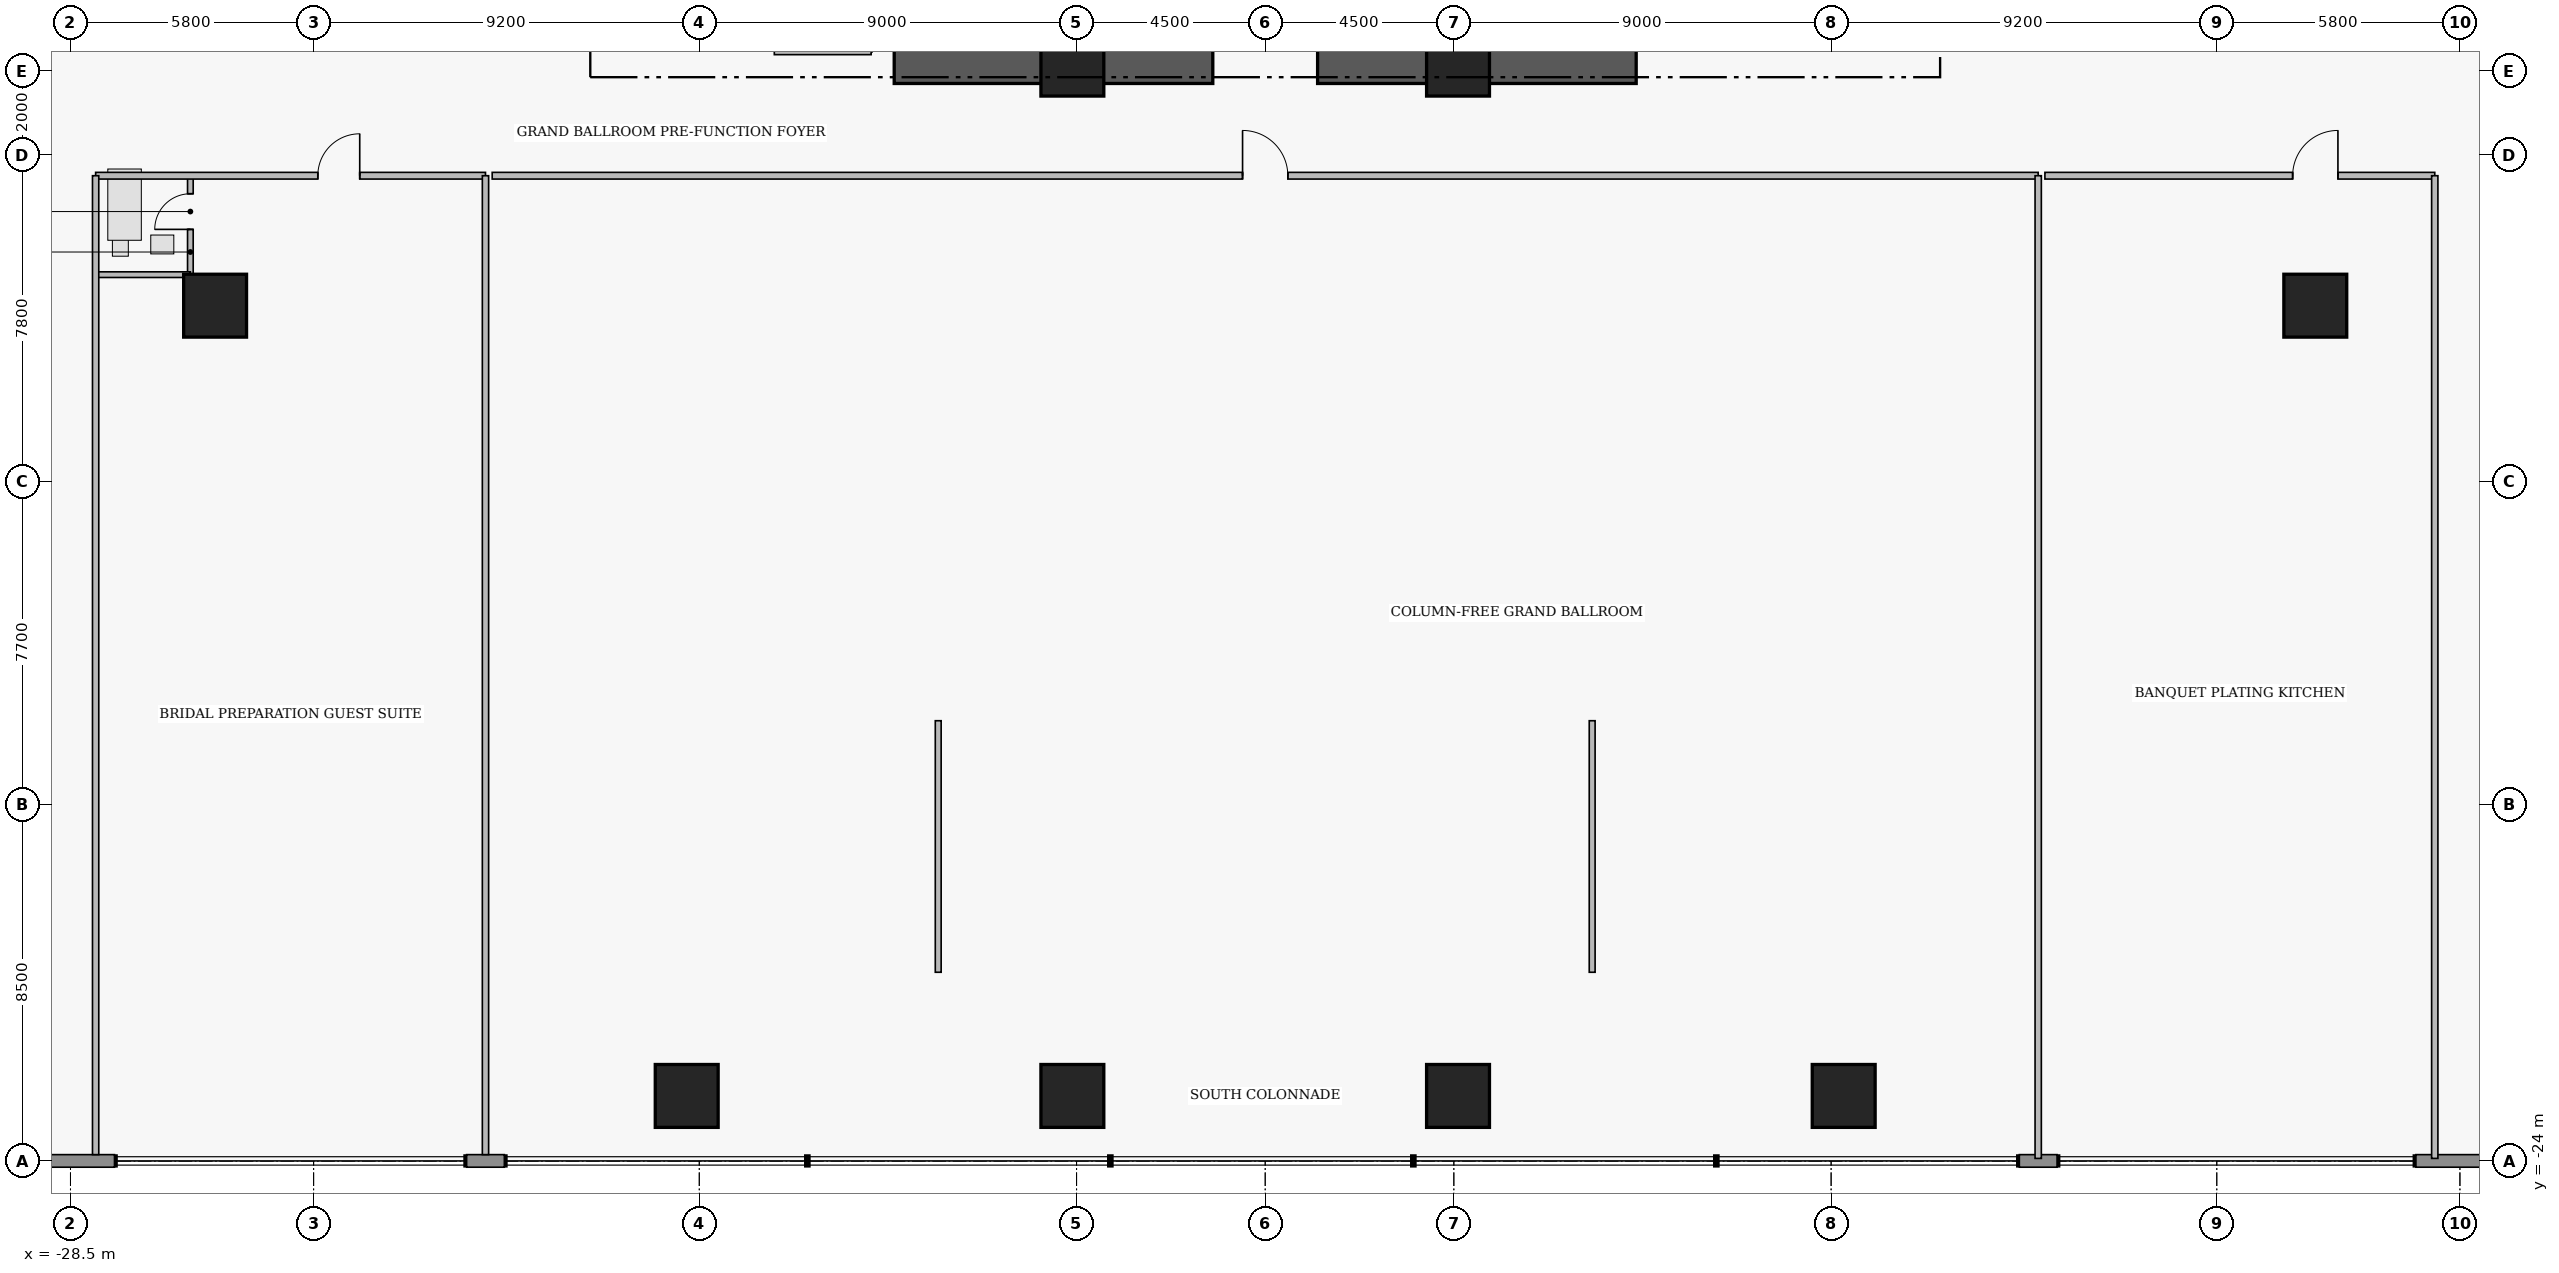
"""IFC4 building model, lengths in metres.
Left out: names, types, materials, properties, quantities, classifications, styles, units other than length and angle.
Written with IfcOpenShell. Run it as: python <this file> out.ifc"""

import sys

from ifc_helpers import new_model, si_unit, direction, frame, frame_2d, origin, origin_2d, place, context, subcontext, project, spatial, rectangle, extrude, element, fill, save


model = new_model("IFC4")
c1 = context("Model", 3, precision=1e-05, world=origin(), true_north=direction((0.0, 1.0)))
c2 = subcontext(c1, "Body", "Model", "MODEL_VIEW")
j1 = project(units=[si_unit("LENGTHUNIT", "METRE"), si_unit("PLANEANGLEUNIT", "RADIAN")], contexts=[c1])
p1 = place(None, origin())
s1 = spatial("IfcSite", under=j1, at=p1, CompositionType="ELEMENT")
p2 = place(p1, origin())
s2 = spatial("IfcBuilding", under=s1, at=p2, CompositionType="ELEMENT")
p3 = place(p2, frame((0.0, 0.0, 11.4)))
s3 = spatial("IfcBuildingStorey", under=s2, at=p3, CompositionType="ELEMENT", Elevation=11.4)
for number, where, z_axis, x_axis in (
    (1, (-8.85, 2.15, 0.0), (0.0, 0.0, 1.0), (1.0, 0.0, 0.0)),
    (2, (1.25, 2.15, 0.0), (0.0, 0.0, 1.0), (1.0, 0.0, 0.0)),
):
    element("IfcWall", number, at=place(p3, frame(where, z_axis=z_axis, x_axis=x_axis)), inside=s3, PredefinedType="SHEAR", context=c2, shape_type="SweptSolid", body=[
        extrude(rectangle(XDim=7.6, YDim=0.9, at=frame_2d((3.8, 0.0))), origin(), (0.0, 0.0, 1.0), 6.34),
    ])
for number, where, z_axis, x_axis in (
    (3, (-4.6, 2.15, 0.0), (0.0, 0.0, 1.0), (1.0, 0.0, 0.0)),
    (4, (4.6, 2.15, 0.0), (0.0, 0.0, 1.0), (1.0, 0.0, 0.0)),
    (5, (-13.8, -22.45, 0.0), (0.0, 0.0, 1.0), (1.0, 0.0, 0.0)),
    (6, (-4.6, -22.45, 0.0), (0.0, 0.0, 1.0), (1.0, 0.0, 0.0)),
    (7, (4.6, -22.45, 0.0), (0.0, 0.0, 1.0), (1.0, 0.0, 0.0)),
    (8, (13.8, -22.45, 0.0), (0.0, 0.0, 1.0), (1.0, 0.0, 0.0)),
    (9, (-25.05, -3.6, 0.0), (0.0, 0.0, 1.0), (1.0, 0.0, 0.0)),
    (10, (25.05, -3.6, 0.0), (0.0, 0.0, 1.0), (1.0, 0.0, 0.0)),
):
    element("IfcColumn", number, at=place(p3, frame(where, z_axis=z_axis, x_axis=x_axis)), inside=s3, PredefinedType="COLUMN", context=c2, shape_type="SweptSolid", body=[
        extrude(rectangle(XDim=1.5, YDim=1.5, at=origin_2d()), origin(), (0.0, 0.0, 1.0), 6.6),
    ])
p4 = place(p3, frame((32.0, -24.0, 0.0), z_axis=(0.0, 0.0, 1.0), x_axis=(-1.0, 0.0, 0.0)))
e11 = element("IfcWall", 11, at=p4, inside=s3, PredefinedType="STANDARD", context=c2, shape_type="SweptSolid", body=[
    extrude(rectangle(XDim=4.55, YDim=0.3, at=frame_2d((2.275, 0.0))), origin(), (0.0, 0.0, 1.0), 6.34),
])
p5 = place(p3, frame((18.89, -24.0, 0.0), z_axis=(0.0, 0.0, 1.0), x_axis=(-1.0, 0.0, 0.0)))
e12 = element("IfcWall", 12, at=p5, inside=s3, PredefinedType="STANDARD", context=c2, shape_type="SweptSolid", body=[
    extrude(rectangle(XDim=0.9, YDim=0.3, at=frame_2d((0.45, 0.0))), origin(), (0.0, 0.0, 1.0), 6.34),
])
p6 = place(p3, frame((-18.15, -24.0, 0.0), z_axis=(0.0, 0.0, 1.0), x_axis=(-1.0, 0.0, 0.0)))
e13 = element("IfcWall", 13, at=p6, inside=s3, PredefinedType="STANDARD", context=c2, shape_type="SweptSolid", body=[
    extrude(rectangle(XDim=0.9, YDim=0.3, at=frame_2d((0.45, 0.0))), origin(), (0.0, 0.0, 1.0), 6.34),
])
p7 = place(p3, frame((-27.45, -24.0, 0.0), z_axis=(0.0, 0.0, 1.0), x_axis=(-1.0, 0.0, 0.0)))
e14 = element("IfcWall", 14, at=p7, inside=s3, PredefinedType="STANDARD", context=c2, shape_type="SweptSolid", body=[
    extrude(rectangle(XDim=4.55, YDim=0.3, at=frame_2d((2.275, 0.0))), origin(), (0.0, 0.0, 1.0), 6.34),
])
p8 = place(p3, frame((-25.64, -2.86, 0.0), z_axis=(0.0, 0.0, 1.0), x_axis=(0.0, 1.0, 0.0)))
e15 = element("IfcWall", 15, at=p8, inside=s3, PredefinedType="PLUMBINGWALL", context=c2, shape_type="SweptSolid", body=[
    extrude(rectangle(XDim=2.36, YDim=0.135, at=frame_2d((1.18, 0.0))), origin(), (0.0, 0.0, 1.0), 6.34),
])
p9 = place(p8, frame((1.08, 0.0, 0.0)))
e16 = element("IfcOpeningElement", 16, at=p9, cuts=e15, PredefinedType="OPENING", context=c2, shape_type="SweptSolid", body=[
    extrude(rectangle(XDim=0.85, YDim=2.1, at=frame_2d((0.425, 1.05))), frame((0.0, 0.077, 0.0), z_axis=(0.0, -1.0, 0.0), x_axis=(1.0, 0.0, 0.0)), (0.0, 0.0, 1.0), 0.155),
])
p10 = place(p3, frame((-27.9, -0.5, 0.0), z_axis=(0.0, 0.0, 1.0), x_axis=(1.0, 0.0, 0.0)))
e17 = element("IfcWall", 17, at=p10, inside=s3, PredefinedType="PARTITIONING", context=c2, shape_type="SweptSolid", body=[
    extrude(rectangle(XDim=9.3, YDim=0.16, at=frame_2d((4.65, 0.0))), origin(), (0.0, 0.0, 1.0), 6.34),
])
p11 = place(p10, frame((5.3, 0.0, 0.0)))
e18 = element("IfcOpeningElement", 18, at=p11, cuts=e17, PredefinedType="OPENING", context=c2, shape_type="SweptSolid", body=[
    extrude(rectangle(XDim=1.0, YDim=2.15, at=frame_2d((0.5, 1.075))), frame((0.0, 0.09, 0.0), z_axis=(0.0, -1.0, 0.0), x_axis=(1.0, 0.0, 0.0)), (0.0, 0.0, 1.0), 0.18),
])
p12 = place(p3, frame((-18.44, -0.5, 0.0), z_axis=(0.0, 0.0, 1.0), x_axis=(1.0, 0.0, 0.0)))
e19 = element("IfcWall", 19, at=p12, inside=s3, PredefinedType="PARTITIONING", context=c2, shape_type="SweptSolid", body=[
    extrude(rectangle(XDim=36.88, YDim=0.16, at=frame_2d((18.44, 0.0))), origin(), (0.0, 0.0, 1.0), 6.34),
])
p13 = place(p12, frame((17.9, 0.0, 0.0)))
e20 = element("IfcOpeningElement", 20, at=p13, cuts=e19, PredefinedType="OPENING", context=c2, shape_type="SweptSolid", body=[
    extrude(rectangle(XDim=1.08, YDim=2.18, at=frame_2d((0.54, 1.09))), frame((0.0, 0.09, 0.0), z_axis=(0.0, -1.0, 0.0), x_axis=(1.0, 0.0, 0.0)), (0.0, 0.0, 1.0), 0.18),
])
p14 = place(p3, frame((18.6, -0.5, 0.0), z_axis=(0.0, 0.0, 1.0), x_axis=(1.0, 0.0, 0.0)))
e21 = element("IfcWall", 21, at=p14, inside=s3, PredefinedType="PARTITIONING", context=c2, shape_type="SweptSolid", body=[
    extrude(rectangle(XDim=9.3, YDim=0.16, at=frame_2d((4.65, 0.0))), origin(), (0.0, 0.0, 1.0), 6.34),
])
p15 = place(p14, frame((5.91, 0.0, 0.0)))
e22 = element("IfcOpeningElement", 22, at=p15, cuts=e21, PredefinedType="OPENING", context=c2, shape_type="SweptSolid", body=[
    extrude(rectangle(XDim=1.08, YDim=2.18, at=frame_2d((0.54, 1.09))), frame((0.0, 0.09, 0.0), z_axis=(0.0, -1.0, 0.0), x_axis=(1.0, 0.0, 0.0)), (0.0, 0.0, 1.0), 0.18),
])
p16 = place(p3, frame((-11.71, 2.47, 0.0), z_axis=(0.0, 0.0, 1.0), x_axis=(1.0, 0.0, 0.0)))
e23 = element("IfcWall", 23, at=p16, inside=s3, PredefinedType="PARTITIONING", context=c2, shape_type="SweptSolid", body=[
    extrude(rectangle(XDim=2.31, YDim=0.165, at=frame_2d((1.155, 0.0))), origin(), (0.0, 0.0, 1.0), 4.94),
])
p17 = place(p3, frame((-27.9, -2.86, 0.0), z_axis=(0.0, 0.0, 1.0), x_axis=(1.0, 0.0, 0.0)))
e24 = element("IfcWall", 24, at=p17, inside=s3, PredefinedType="PLUMBINGWALL", context=c2, shape_type="SweptSolid", body=[
    extrude(rectangle(XDim=2.26, YDim=0.135, at=frame_2d((1.13, 0.0))), origin(), (0.0, 0.0, 1.0), 6.34),
])
for number, where, z_axis, x_axis in (
    (25, (-27.9, -23.85, 0.0), (0.0, 0.0, 1.0), (0.0, 1.0, 0.0)),
    (26, (-18.6, -23.85, 0.0), (0.0, 0.0, 1.0), (0.0, 1.0, 0.0)),
):
    element("IfcWall", number, at=place(p3, frame(where, z_axis=z_axis, x_axis=x_axis)), inside=s3, PredefinedType="PARTITIONING", context=c2, shape_type="SweptSolid", body=[
        extrude(rectangle(XDim=23.35, YDim=0.15, at=frame_2d((11.675, 0.0))), origin(), (0.0, 0.0, 1.0), 6.34),
    ])
for number, where, z_axis, x_axis in (
    (27, (18.44, -23.94, 0.0), (0.0, 0.0, 1.0), (0.0, 1.0, 0.0)),
    (28, (27.9, -23.94, 0.0), (0.0, 0.0, 1.0), (0.0, 1.0, 0.0)),
):
    element("IfcWall", number, at=place(p3, frame(where, z_axis=z_axis, x_axis=x_axis)), inside=s3, PredefinedType="PARTITIONING", context=c2, shape_type="SweptSolid", body=[
        extrude(rectangle(XDim=23.44, YDim=0.15, at=frame_2d((11.72, 0.0))), origin(), (0.0, 0.0, 1.0), 6.34),
    ])
for number, where, z_axis, x_axis in (
    (29, (-7.8, -19.5, 0.0), (0.0, 0.0, 1.0), (0.0, 1.0, 0.0)),
    (30, (7.8, -19.5, 0.0), (0.0, 0.0, 1.0), (0.0, 1.0, 0.0)),
):
    element("IfcWall", number, at=place(p3, frame(where, z_axis=z_axis, x_axis=x_axis)), inside=s3, PredefinedType="MOVABLE", context=c2, shape_type="SweptSolid", body=[
        extrude(rectangle(XDim=6.0, YDim=0.14, at=frame_2d((3.0, 0.0))), origin(), (0.0, 0.0, 1.0), 6.34),
    ])
p18 = place(p9, origin())
e31 = element("IfcDoor", 31, at=p18, inside=s3, OperationType="SINGLE_SWING_LEFT", PredefinedType="DOOR", context=c2, shape_type="SweptSolid", body=[
    extrude(rectangle(XDim=0.85, YDim=2.1, at=frame_2d((0.425, 1.05))), frame((0.0, 0.025, 0.0), z_axis=(0.0, -1.0, 0.0), x_axis=(1.0, 0.0, 0.0)), (0.0, 0.0, 1.0), 0.05),
])
fill(e16, e31)
p19 = place(p11, origin())
e32 = element("IfcDoor", 32, at=p19, inside=s3, OperationType="SINGLE_SWING_RIGHT", PredefinedType="DOOR", context=c2, shape_type="SweptSolid", body=[
    extrude(rectangle(XDim=1.0, YDim=2.15, at=frame_2d((0.5, 1.075))), frame((0.0, 0.025, 0.0), z_axis=(0.0, -1.0, 0.0), x_axis=(1.0, 0.0, 0.0)), (0.0, 0.0, 1.0), 0.05),
])
fill(e18, e32)
p20 = place(p13, origin())
e33 = element("IfcDoor", 33, at=p20, inside=s3, OperationType="SINGLE_SWING_LEFT", PredefinedType="DOOR", context=c2, shape_type="SweptSolid", body=[
    extrude(rectangle(XDim=1.08, YDim=2.18, at=frame_2d((0.54, 1.09))), frame((0.0, 0.025, 0.0), z_axis=(0.0, -1.0, 0.0), x_axis=(1.0, 0.0, 0.0)), (0.0, 0.0, 1.0), 0.05),
])
fill(e20, e33)
p21 = place(p15, origin())
e34 = element("IfcDoor", 34, at=p21, inside=s3, OperationType="SINGLE_SWING_RIGHT", PredefinedType="DOOR", context=c2, shape_type="SweptSolid", body=[
    extrude(rectangle(XDim=1.08, YDim=2.18, at=frame_2d((0.54, 1.09))), frame((0.0, 0.025, 0.0), z_axis=(0.0, -1.0, 0.0), x_axis=(1.0, 0.0, 0.0)), (0.0, 0.0, 1.0), 0.05),
])
fill(e22, e34)
save(model, sys.argv[1])
